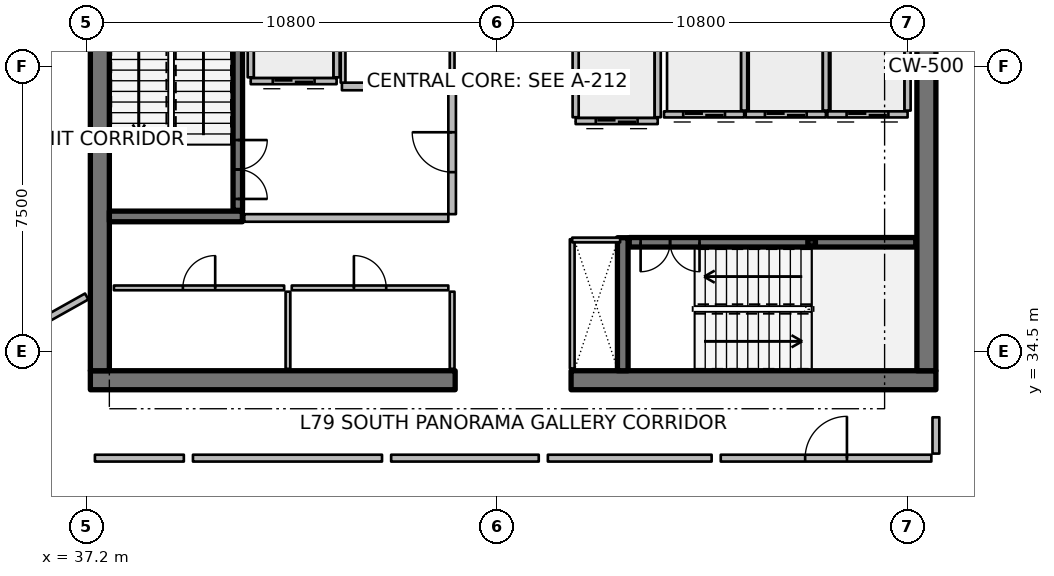
"""IFC4 building model, lengths in metres.
Left out: names, types, materials, properties, quantities, classifications, styles, units other than length and angle.
Written with IfcOpenShell. Run it as: python <this file> out.ifc"""

import sys

from ifc_helpers import new_model, si_unit, direction, frame, frame_2d, origin, origin_2d, place, context, subcontext, project, spatial, rectangle, hollow_rectangle, extrude, element, fill, save


model = new_model("IFC4")
c1 = context("Model", 3, precision=1e-05, world=origin(), true_north=direction((0.0, 1.0)))
c2 = subcontext(c1, "Body", "Model", "MODEL_VIEW")
j1 = project(units=[si_unit("LENGTHUNIT", "METRE"), si_unit("PLANEANGLEUNIT", "RADIAN")], contexts=[c1])
p1 = place(None, origin())
s1 = spatial("IfcSite", under=j1, at=p1, CompositionType="ELEMENT")
p2 = place(p1, origin())
s2 = spatial("IfcBuilding", under=s1, at=p2, CompositionType="ELEMENT")
p3 = place(p2, frame((0.0, 0.0, 313.7)))
s3 = spatial("IfcBuildingStorey", under=s2, at=p3, CompositionType="ELEMENT", Elevation=313.7)
p4 = place(p3, frame((37.3, 33.75, 0.0), z_axis=(0.0, 0.0, 1.0), x_axis=(1.0, 0.0, 0.0)))
e1 = element("IfcWall", 1, at=p4, inside=s3, PredefinedType="SHEAR", context=c2, shape_type="SweptSolid", body=[
    extrude(rectangle(XDim=9.6, YDim=0.5, at=frame_2d((4.8, 0.0))), origin(), (0.0, 0.0, 1.0), 4.2),
])
p5 = place(p3, frame((49.95, 33.75, 0.0), z_axis=(0.0, 0.0, 1.0), x_axis=(1.0, 0.0, 0.0)))
e2 = element("IfcWall", 2, at=p5, inside=s3, PredefinedType="SHEAR", context=c2, shape_type="SweptSolid", body=[
    extrude(rectangle(XDim=9.6, YDim=0.5, at=frame_2d((4.8, 0.0))), origin(), (0.0, 0.0, 1.0), 4.2),
])
for number, where, z_axis, x_axis in (
    (3, (37.55, 34.0, 0.0), (0.0, 0.0, 1.0), (0.0, 1.0, 0.0)),
    (4, (59.3, 34.0, 0.0), (0.0, 0.0, 1.0), (0.0, 1.0, 0.0)),
):
    element("IfcWall", number, at=place(p3, frame(where, z_axis=z_axis, x_axis=x_axis)), inside=s3, PredefinedType="SHEAR", context=c2, shape_type="SweptSolid", body=[
        extrude(rectangle(XDim=16.0, YDim=0.5, at=frame_2d((8.0, 0.0))), origin(), (0.0, 0.0, 1.0), 4.2),
    ])
for number, where, z_axis, x_axis in (
    (5, (37.8, 38.06, 0.0), (0.0, 0.0, 1.0), (1.0, 0.0, 0.0)),
    (6, (51.31, 34.0, 0.0), (0.0, 0.0, 1.0), (0.0, 1.0, 0.0)),
):
    element("IfcWall", number, at=place(p3, frame(where, z_axis=z_axis, x_axis=x_axis)), inside=s3, PredefinedType="SHEAR", context=c2, shape_type="SweptSolid", body=[
        extrude(rectangle(XDim=3.5, YDim=0.28, at=frame_2d((1.75, 0.0))), origin(), (0.0, 0.0, 1.0), 4.2),
    ])
p6 = place(p3, frame((56.28, 37.38, 0.0), z_axis=(0.0, 0.0, 1.0), x_axis=(1.0, 0.0, 0.0)))
e7 = element("IfcColumn", 7, at=p6, inside=s3, PredefinedType="COLUMN", context=c2, shape_type="SweptSolid", body=[
    extrude(hollow_rectangle(XDim=0.2, YDim=0.2, WallThickness=0.01, InnerFilletRadius=0.01, OuterFilletRadius=0.02, at=origin_2d()), origin(), (0.0, 0.0, 1.0), 1.895),
])
p7 = place(p3, frame((41.18, 38.22, 0.0), z_axis=(0.0, 0.0, 1.0), x_axis=(0.0, 1.0, 0.0)))
e8 = element("IfcWall", 8, at=p7, inside=s3, PredefinedType="SOLIDWALL", context=c2, shape_type="SweptSolid", body=[
    extrude(rectangle(XDim=7.56, YDim=0.25, at=frame_2d((3.78, 0.0))), origin(), (0.0, 0.0, 1.0), 3.94),
])
p8 = place(p7, frame((0.3, 0.0, 0.0)))
e9 = element("IfcOpeningElement", 9, at=p8, cuts=e8, PredefinedType="OPENING", context=c2, shape_type="SweptSolid", body=[
    extrude(rectangle(XDim=1.55, YDim=2.15, at=frame_2d((0.775, 1.075))), frame((0.0, 0.135, 0.0), z_axis=(0.0, -1.0, 0.0), x_axis=(1.0, 0.0, 0.0)), (0.0, 0.0, 1.0), 0.27),
])
p9 = place(p3, frame((51.48, 37.38, 0.0), z_axis=(0.0, 0.0, 1.0), x_axis=(1.0, 0.0, 0.0)))
e10 = element("IfcWall", 10, at=p9, inside=s3, PredefinedType="SOLIDWALL", context=c2, shape_type="SweptSolid", body=[
    extrude(rectangle(XDim=7.54, YDim=0.25, at=frame_2d((3.77, 0.0))), origin(), (0.0, 0.0, 1.0), 3.94),
])
p10 = place(p9, frame((0.3, 0.0, 0.0)))
e11 = element("IfcOpeningElement", 11, at=p10, cuts=e10, PredefinedType="OPENING", context=c2, shape_type="SweptSolid", body=[
    extrude(rectangle(XDim=1.55, YDim=2.15, at=frame_2d((0.775, 1.075))), frame((0.0, 0.135, 0.0), z_axis=(0.0, -1.0, 0.0), x_axis=(1.0, 0.0, 0.0)), (0.0, 0.0, 1.0), 0.27),
])
p11 = place(p3, frame((54.505, 40.745, 0.0), z_axis=(0.0, 0.0, 1.0), x_axis=(-1.0, 0.0, 0.0)))
e12 = element("IfcWall", 12, at=p11, inside=s3, PredefinedType="PARTITIONING", context=c2, shape_type="SweptSolid", body=[
    extrude(rectangle(XDim=2.11, YDim=0.16, at=frame_2d((1.055, 0.0))), origin(), (0.0, 0.0, 1.0), 3.94),
])
p12 = place(p11, frame((0.505, 0.0, 0.0)))
e13 = element("IfcOpeningElement", 13, at=p12, cuts=e12, PredefinedType="OPENING", context=c2, shape_type="SweptSolid", body=[
    extrude(rectangle(XDim=1.1, YDim=2.1, at=frame_2d((0.55, 1.05))), frame((0.0, 0.09, 0.0), z_axis=(0.0, -1.0, 0.0), x_axis=(1.0, 0.0, 0.0)), (0.0, 0.0, 1.0), 0.18),
])
p13 = place(p3, frame((54.505, 40.845, 0.0), z_axis=(0.0, 0.0, 1.0), x_axis=(0.0, 1.0, 0.0)))
e14 = element("IfcWall", 14, at=p13, inside=s3, PredefinedType="PARTITIONING", context=c2, shape_type="SweptSolid", body=[
    extrude(rectangle(XDim=1.61, YDim=0.16, at=frame_2d((0.805, 0.0))), origin(), (0.0, 0.0, 1.0), 3.94),
])
p14 = place(p3, frame((56.655, 40.745, 0.0), z_axis=(0.0, 0.0, 1.0), x_axis=(-1.0, 0.0, 0.0)))
e15 = element("IfcWall", 15, at=p14, inside=s3, PredefinedType="PARTITIONING", context=c2, shape_type="SweptSolid", body=[
    extrude(rectangle(XDim=2.11, YDim=0.16, at=frame_2d((1.055, 0.0))), origin(), (0.0, 0.0, 1.0), 3.94),
])
p15 = place(p14, frame((0.505, 0.0, 0.0)))
e16 = element("IfcOpeningElement", 16, at=p15, cuts=e15, PredefinedType="OPENING", context=c2, shape_type="SweptSolid", body=[
    extrude(rectangle(XDim=1.1, YDim=2.1, at=frame_2d((0.55, 1.05))), frame((0.0, 0.09, 0.0), z_axis=(0.0, -1.0, 0.0), x_axis=(1.0, 0.0, 0.0)), (0.0, 0.0, 1.0), 0.18),
])
p16 = place(p3, frame((56.655, 40.845, 0.0), z_axis=(0.0, 0.0, 1.0), x_axis=(0.0, 1.0, 0.0)))
e17 = element("IfcWall", 17, at=p16, inside=s3, PredefinedType="PARTITIONING", context=c2, shape_type="SweptSolid", body=[
    extrude(rectangle(XDim=1.61, YDim=0.16, at=frame_2d((0.805, 0.0))), origin(), (0.0, 0.0, 1.0), 3.94),
])
p17 = place(p3, frame((58.805, 40.745, 0.0), z_axis=(0.0, 0.0, 1.0), x_axis=(-1.0, 0.0, 0.0)))
e18 = element("IfcWall", 18, at=p17, inside=s3, PredefinedType="PARTITIONING", context=c2, shape_type="SweptSolid", body=[
    extrude(rectangle(XDim=2.11, YDim=0.16, at=frame_2d((1.055, 0.0))), origin(), (0.0, 0.0, 1.0), 3.94),
])
p18 = place(p17, frame((0.505, 0.0, 0.0)))
e19 = element("IfcOpeningElement", 19, at=p18, cuts=e18, PredefinedType="OPENING", context=c2, shape_type="SweptSolid", body=[
    extrude(rectangle(XDim=1.1, YDim=2.1, at=frame_2d((0.55, 1.05))), frame((0.0, 0.09, 0.0), z_axis=(0.0, -1.0, 0.0), x_axis=(1.0, 0.0, 0.0)), (0.0, 0.0, 1.0), 0.18),
])
p19 = place(p3, frame((58.805, 40.845, 0.0), z_axis=(0.0, 0.0, 1.0), x_axis=(0.0, 1.0, 0.0)))
e20 = element("IfcWall", 20, at=p19, inside=s3, PredefinedType="PARTITIONING", context=c2, shape_type="SweptSolid", body=[
    extrude(rectangle(XDim=1.61, YDim=0.16, at=frame_2d((0.805, 0.0))), origin(), (0.0, 0.0, 1.0), 3.94),
])
p20 = place(p3, frame((43.78, 41.62, 0.0), z_axis=(0.0, 0.0, 1.0), x_axis=(-1.0, 0.0, 0.0)))
e21 = element("IfcWall", 21, at=p20, inside=s3, PredefinedType="PARTITIONING", context=c2, shape_type="SweptSolid", body=[
    extrude(rectangle(XDim=2.26, YDim=0.16, at=frame_2d((1.13, 0.0))), origin(), (0.0, 0.0, 1.0), 3.94),
])
p21 = place(p20, frame((0.58, 0.0, 0.0)))
e22 = element("IfcOpeningElement", 22, at=p21, cuts=e21, PredefinedType="OPENING", context=c2, shape_type="SweptSolid", body=[
    extrude(rectangle(XDim=1.1, YDim=2.1, at=frame_2d((0.55, 1.05))), frame((0.0, 0.09, 0.0), z_axis=(0.0, -1.0, 0.0), x_axis=(1.0, 0.0, 0.0)), (0.0, 0.0, 1.0), 0.18),
])
for number, where, z_axis, x_axis in (
    (23, (43.78, 41.72, 0.0), (0.0, 0.0, 1.0), (0.0, 1.0, 0.0)),
    (24, (41.52, 41.72, 0.0), (0.0, 0.0, 1.0), (0.0, 1.0, 0.0)),
):
    element("IfcWall", number, at=place(p3, frame(where, z_axis=z_axis, x_axis=x_axis)), inside=s3, PredefinedType="PARTITIONING", context=c2, shape_type="SweptSolid", body=[
        extrude(rectangle(XDim=2.26, YDim=0.16, at=frame_2d((1.13, 0.0))), origin(), (0.0, 0.0, 1.0), 3.94),
    ])
p22 = place(p3, frame((52.23, 40.57, 0.0), z_axis=(0.0, 0.0, 1.0), x_axis=(-1.0, 0.0, 0.0)))
e25 = element("IfcWall", 25, at=p22, inside=s3, PredefinedType="PARTITIONING", context=c2, shape_type="SweptSolid", body=[
    extrude(rectangle(XDim=2.16, YDim=0.16, at=frame_2d((1.08, 0.0))), origin(), (0.0, 0.0, 1.0), 3.94),
])
p23 = place(p22, frame((0.53, 0.0, 0.0)))
e26 = element("IfcOpeningElement", 26, at=p23, cuts=e25, PredefinedType="OPENING", context=c2, shape_type="SweptSolid", body=[
    extrude(rectangle(XDim=1.1, YDim=2.1, at=frame_2d((0.55, 1.05))), frame((0.0, 0.09, 0.0), z_axis=(0.0, -1.0, 0.0), x_axis=(1.0, 0.0, 0.0)), (0.0, 0.0, 1.0), 0.18),
])
for number, where, z_axis, x_axis in (
    (27, (52.23, 40.67, 0.0), (0.0, 0.0, 1.0), (0.0, 1.0, 0.0)),
    (28, (50.07, 40.67, 0.0), (0.0, 0.0, 1.0), (0.0, 1.0, 0.0)),
):
    element("IfcWall", number, at=place(p3, frame(where, z_axis=z_axis, x_axis=x_axis)), inside=s3, PredefinedType="PARTITIONING", context=c2, shape_type="SweptSolid", body=[
        extrude(rectangle(XDim=2.16, YDim=0.16, at=frame_2d((1.08, 0.0))), origin(), (0.0, 0.0, 1.0), 3.94),
    ])
for number, where, z_axis, x_axis in (
    (29, (46.82, 34.05, 0.0), (0.0, 0.0, 1.0), (0.0, 1.0, 0.0)),
    (30, (42.5, 34.05, 0.0), (0.0, 0.0, 1.0), (0.0, 1.0, 0.0)),
):
    element("IfcWall", number, at=place(p3, frame(where, z_axis=z_axis, x_axis=x_axis)), inside=s3, PredefinedType="PARTITIONING", context=c2, shape_type="SweptSolid", body=[
        extrude(rectangle(XDim=2.03, YDim=0.125, at=frame_2d((1.015, 0.0))), origin(), (0.0, 0.0, 1.0), 3.38),
    ])
p24 = place(p3, frame((37.92, 36.18, 0.0), z_axis=(0.0, 0.0, 1.0), x_axis=(1.0, 0.0, 0.0)))
e31 = element("IfcWall", 31, at=p24, inside=s3, PredefinedType="PARTITIONING", context=c2, shape_type="SweptSolid", body=[
    extrude(rectangle(XDim=4.48, YDim=0.125, at=frame_2d((2.24, 0.0))), origin(), (0.0, 0.0, 1.0), 3.38),
])
p25 = place(p24, frame((1.815, 0.0, 0.0)))
e32 = element("IfcOpeningElement", 32, at=p25, cuts=e31, PredefinedType="OPENING", context=c2, shape_type="SweptSolid", body=[
    extrude(rectangle(XDim=0.85, YDim=2.06, at=frame_2d((0.425, 1.03))), frame((0.0, 0.073, 0.0), z_axis=(0.0, -1.0, 0.0), x_axis=(1.0, 0.0, 0.0)), (0.0, 0.0, 1.0), 0.145),
])
p26 = place(p3, frame((42.6, 36.18, 0.0), z_axis=(0.0, 0.0, 1.0), x_axis=(1.0, 0.0, 0.0)))
e33 = element("IfcWall", 33, at=p26, inside=s3, PredefinedType="PARTITIONING", context=c2, shape_type="SweptSolid", body=[
    extrude(rectangle(XDim=4.12, YDim=0.125, at=frame_2d((2.06, 0.0))), origin(), (0.0, 0.0, 1.0), 3.38),
])
p27 = place(p26, frame((1.635, 0.0, 0.0)))
e34 = element("IfcOpeningElement", 34, at=p27, cuts=e33, PredefinedType="OPENING", context=c2, shape_type="SweptSolid", body=[
    extrude(rectangle(XDim=0.85, YDim=2.06, at=frame_2d((0.425, 1.03))), frame((0.0, 0.073, 0.0), z_axis=(0.0, -1.0, 0.0), x_axis=(1.0, 0.0, 0.0)), (0.0, 0.0, 1.0), 0.145),
])
p28 = place(p3, frame((41.35, 38.02, 0.0), z_axis=(0.0, 0.0, 1.0), x_axis=(1.0, 0.0, 0.0)))
e35 = element("IfcWall", 35, at=p28, inside=s3, PredefinedType="PARTITIONING", context=c2, shape_type="SweptSolid", body=[
    extrude(rectangle(XDim=5.37, YDim=0.2, at=frame_2d((2.685, 0.0))), origin(), (0.0, 0.0, 1.0), 3.94),
])
p29 = place(p3, frame((43.92, 41.48, 0.0), z_axis=(0.0, 0.0, 1.0), x_axis=(1.0, 0.0, 0.0)))
e36 = element("IfcWall", 36, at=p29, inside=s3, PredefinedType="PARTITIONING", context=c2, shape_type="SweptSolid", body=[
    extrude(rectangle(XDim=2.8, YDim=0.2, at=frame_2d((1.4, 0.0))), origin(), (0.0, 0.0, 1.0), 3.94),
])
p30 = place(p3, frame((46.82, 38.12, 0.0), z_axis=(0.0, 0.0, 1.0), x_axis=(0.0, 1.0, 0.0)))
e37 = element("IfcWall", 37, at=p30, inside=s3, PredefinedType="PARTITIONING", context=c2, shape_type="SweptSolid", body=[
    extrude(rectangle(XDim=3.26, YDim=0.2, at=frame_2d((1.63, 0.0))), origin(), (0.0, 0.0, 1.0), 3.94),
])
p31 = place(p30, frame((1.105, 0.0, 0.0)))
e38 = element("IfcOpeningElement", 38, at=p31, cuts=e37, PredefinedType="OPENING", context=c2, shape_type="SweptSolid", body=[
    extrude(rectangle(XDim=1.05, YDim=2.1, at=frame_2d((0.525, 1.05))), frame((0.0, 0.11, 0.0), z_axis=(0.0, -1.0, 0.0), x_axis=(1.0, 0.0, 0.0)), (0.0, 0.0, 1.0), 0.22),
])
p32 = place(p3, frame((49.98, 34.06, 0.0), z_axis=(0.0, 0.0, 1.0), x_axis=(0.0, 1.0, 0.0)))
e39 = element("IfcWall", 39, at=p32, inside=s3, PredefinedType="PARTITIONING", context=c2, shape_type="SweptSolid", body=[
    extrude(rectangle(XDim=3.4, YDim=0.125, at=frame_2d((1.7, 0.0))), origin(), (0.0, 0.0, 1.0), 3.38),
])
p33 = place(p3, frame((49.98, 37.44, 0.0), z_axis=(0.0, 0.0, 1.0), x_axis=(1.0, 0.0, 0.0)))
e40 = element("IfcWall", 40, at=p33, inside=s3, PredefinedType="PARTITIONING", context=c2, shape_type="SweptSolid", body=[
    extrude(rectangle(XDim=1.26, YDim=0.125, at=frame_2d((0.63, 0.0))), origin(), (0.0, 0.0, 1.0), 3.38),
])
p34 = place(p3, frame((43.95, 41.58, 0.0), z_axis=(0.0, 0.0, 1.0), x_axis=(0.0, 1.0, 0.0)))
e41 = element("IfcWall", 41, at=p34, inside=s3, PredefinedType="PARTITIONING", context=c2, shape_type="SweptSolid", body=[
    extrude(rectangle(XDim=4.32, YDim=0.125, at=frame_2d((2.16, 0.0))), origin(), (0.0, 0.0, 1.0), 3.38),
])
p35 = place(p3, frame((46.82, 41.58, 0.0), z_axis=(0.0, 0.0, 1.0), x_axis=(0.0, 1.0, 0.0)))
e42 = element("IfcWall", 42, at=p35, inside=s3, PredefinedType="PARTITIONING", context=c2, shape_type="SweptSolid", body=[
    extrude(rectangle(XDim=4.3, YDim=0.125, at=frame_2d((2.15, 0.0))), origin(), (0.0, 0.0, 1.0), 3.38),
])
p36 = place(p35, frame((1.725, 0.0, 0.0)))
e43 = element("IfcOpeningElement", 43, at=p36, cuts=e42, PredefinedType="OPENING", context=c2, shape_type="SweptSolid", body=[
    extrude(rectangle(XDim=0.85, YDim=2.06, at=frame_2d((0.425, 1.03))), frame((0.0, 0.073, 0.0), z_axis=(0.0, -1.0, 0.0), x_axis=(1.0, 0.0, 0.0)), (0.0, 0.0, 1.0), 0.145),
])
p37 = place(p3, frame((37.204, 35.954, 0.0), z_axis=(0.0, 0.0, 1.0), x_axis=(-0.872495191914, -0.488622697064, 0.0)))
e44 = element("IfcWall", 44, at=p37, inside=s3, PredefinedType="PARTITIONING", context=c2, shape_type="SweptSolid", body=[
    extrude(rectangle(XDim=13.462, YDim=0.18, at=frame_2d((6.731, 0.0))), origin(), (0.0, 0.0, 1.0), 3.38),
])
p38 = place(p3, frame((53.888, 31.7, 0.0), z_axis=(0.0, 0.0, 1.0), x_axis=(1.0, 0.0, 0.0)))
e45 = element("IfcWall", 45, at=p38, inside=s3, PredefinedType="PARTITIONING", context=c2, shape_type="SweptSolid", body=[
    extrude(rectangle(XDim=5.542, YDim=0.18, at=frame_2d((2.771, 0.0))), origin(), (0.0, 0.0, 1.0), 3.38),
])
p39 = place(p38, frame((2.221, 0.0, 0.0)))
e46 = element("IfcOpeningElement", 46, at=p39, cuts=e45, PredefinedType="OPENING", context=c2, shape_type="SweptSolid", body=[
    extrude(rectangle(XDim=1.1, YDim=2.1, at=frame_2d((0.55, 1.05))), frame((0.0, 0.1, 0.0), z_axis=(0.0, -1.0, 0.0), x_axis=(1.0, 0.0, 0.0)), (0.0, 0.0, 1.0), 0.2),
])
p40 = place(p3, frame((59.55, 31.82, 0.0), z_axis=(0.0, 0.0, 1.0), x_axis=(0.0, 1.0, 0.0)))
e47 = element("IfcWall", 47, at=p40, inside=s3, PredefinedType="PARTITIONING", context=c2, shape_type="SweptSolid", body=[
    extrude(rectangle(XDim=0.955, YDim=0.18, at=frame_2d((0.477, 0.0))), origin(), (0.0, 0.0, 1.0), 3.38),
])
p41 = place(p3, frame((37.42, 31.7, 0.0), z_axis=(0.0, 0.0, 1.0), x_axis=(1.0, 0.0, 0.0)))
e48 = element("IfcWall", 48, at=p41, inside=s3, PredefinedType="PARTITIONING", context=c2, shape_type="SweptSolid", body=[
    extrude(rectangle(XDim=2.34, YDim=0.18, at=frame_2d((1.17, 0.0))), origin(), (0.0, 0.0, 1.0), 3.38),
])
p42 = place(p3, frame((40.0, 31.7, 0.0), z_axis=(0.0, 0.0, 1.0), x_axis=(1.0, 0.0, 0.0)))
e49 = element("IfcWall", 49, at=p42, inside=s3, PredefinedType="PARTITIONING", context=c2, shape_type="SweptSolid", body=[
    extrude(rectangle(XDim=4.975, YDim=0.18, at=frame_2d((2.488, 0.0))), origin(), (0.0, 0.0, 1.0), 3.38),
])
p43 = place(p3, frame((45.215, 31.7, 0.0), z_axis=(0.0, 0.0, 1.0), x_axis=(1.0, 0.0, 0.0)))
e50 = element("IfcWall", 50, at=p43, inside=s3, PredefinedType="PARTITIONING", context=c2, shape_type="SweptSolid", body=[
    extrude(rectangle(XDim=3.884, YDim=0.18, at=frame_2d((1.942, 0.0))), origin(), (0.0, 0.0, 1.0), 3.38),
])
p44 = place(p3, frame((49.339, 31.7, 0.0), z_axis=(0.0, 0.0, 1.0), x_axis=(1.0, 0.0, 0.0)))
e51 = element("IfcWall", 51, at=p44, inside=s3, PredefinedType="PARTITIONING", context=c2, shape_type="SweptSolid", body=[
    extrude(rectangle(XDim=4.309, YDim=0.18, at=frame_2d((2.155, 0.0))), origin(), (0.0, 0.0, 1.0), 3.38),
])
p45 = place(p8, origin())
e52 = element("IfcDoor", 52, at=p45, inside=s3, OperationType="DOUBLE_DOOR_SINGLE_SWING", PredefinedType="DOOR", context=c2, shape_type="SweptSolid", body=[
    extrude(rectangle(XDim=1.55, YDim=2.15, at=frame_2d((0.775, 1.075))), frame((0.0, 0.025, 0.0), z_axis=(0.0, -1.0, 0.0), x_axis=(1.0, 0.0, 0.0)), (0.0, 0.0, 1.0), 0.05),
])
fill(e9, e52)
p46 = place(p10, origin())
e53 = element("IfcDoor", 53, at=p46, inside=s3, OperationType="DOUBLE_DOOR_SINGLE_SWING", PredefinedType="DOOR", context=c2, shape_type="SweptSolid", body=[
    extrude(rectangle(XDim=1.55, YDim=2.15, at=frame_2d((0.775, 1.075))), frame((0.0, 0.025, 0.0), z_axis=(0.0, -1.0, 0.0), x_axis=(1.0, 0.0, 0.0)), (0.0, 0.0, 1.0), 0.05),
])
fill(e11, e53)
p47 = place(p12, origin())
e54 = element("IfcDoor", 54, at=p47, inside=s3, OperationType="DOUBLE_DOOR_SLIDING", PredefinedType="DOOR", context=c2, shape_type="SweptSolid", body=[
    extrude(rectangle(XDim=1.1, YDim=2.1, at=frame_2d((0.55, 1.05))), frame((0.0, 0.025, 0.0), z_axis=(0.0, -1.0, 0.0), x_axis=(1.0, 0.0, 0.0)), (0.0, 0.0, 1.0), 0.05),
])
fill(e13, e54)
p48 = place(p15, origin())
e55 = element("IfcDoor", 55, at=p48, inside=s3, OperationType="DOUBLE_DOOR_SLIDING", PredefinedType="DOOR", context=c2, shape_type="SweptSolid", body=[
    extrude(rectangle(XDim=1.1, YDim=2.1, at=frame_2d((0.55, 1.05))), frame((0.0, 0.025, 0.0), z_axis=(0.0, -1.0, 0.0), x_axis=(1.0, 0.0, 0.0)), (0.0, 0.0, 1.0), 0.05),
])
fill(e16, e55)
p49 = place(p18, origin())
e56 = element("IfcDoor", 56, at=p49, inside=s3, OperationType="DOUBLE_DOOR_SLIDING", PredefinedType="DOOR", context=c2, shape_type="SweptSolid", body=[
    extrude(rectangle(XDim=1.1, YDim=2.1, at=frame_2d((0.55, 1.05))), frame((0.0, 0.025, 0.0), z_axis=(0.0, -1.0, 0.0), x_axis=(1.0, 0.0, 0.0)), (0.0, 0.0, 1.0), 0.05),
])
fill(e19, e56)
p50 = place(p21, origin())
e57 = element("IfcDoor", 57, at=p50, inside=s3, OperationType="DOUBLE_DOOR_SLIDING", PredefinedType="DOOR", context=c2, shape_type="SweptSolid", body=[
    extrude(rectangle(XDim=1.1, YDim=2.1, at=frame_2d((0.55, 1.05))), frame((0.0, 0.025, 0.0), z_axis=(0.0, -1.0, 0.0), x_axis=(1.0, 0.0, 0.0)), (0.0, 0.0, 1.0), 0.05),
])
fill(e22, e57)
p51 = place(p23, origin())
e58 = element("IfcDoor", 58, at=p51, inside=s3, OperationType="DOUBLE_DOOR_SLIDING", PredefinedType="DOOR", context=c2, shape_type="SweptSolid", body=[
    extrude(rectangle(XDim=1.1, YDim=2.1, at=frame_2d((0.55, 1.05))), frame((0.0, 0.025, 0.0), z_axis=(0.0, -1.0, 0.0), x_axis=(1.0, 0.0, 0.0)), (0.0, 0.0, 1.0), 0.05),
])
fill(e26, e58)
p52 = place(p25, origin())
e59 = element("IfcDoor", 59, at=p52, inside=s3, OperationType="SINGLE_SWING_RIGHT", PredefinedType="DOOR", context=c2, shape_type="SweptSolid", body=[
    extrude(rectangle(XDim=0.85, YDim=2.06, at=frame_2d((0.425, 1.03))), frame((0.0, 0.025, 0.0), z_axis=(0.0, -1.0, 0.0), x_axis=(1.0, 0.0, 0.0)), (0.0, 0.0, 1.0), 0.05),
])
fill(e32, e59)
p53 = place(p27, origin())
e60 = element("IfcDoor", 60, at=p53, inside=s3, OperationType="SINGLE_SWING_LEFT", PredefinedType="DOOR", context=c2, shape_type="SweptSolid", body=[
    extrude(rectangle(XDim=0.85, YDim=2.06, at=frame_2d((0.425, 1.03))), frame((0.0, 0.025, 0.0), z_axis=(0.0, -1.0, 0.0), x_axis=(1.0, 0.0, 0.0)), (0.0, 0.0, 1.0), 0.05),
])
fill(e34, e60)
p54 = place(p31, origin())
e61 = element("IfcDoor", 61, at=p54, inside=s3, OperationType="SINGLE_SWING_RIGHT", PredefinedType="DOOR", context=c2, shape_type="SweptSolid", body=[
    extrude(rectangle(XDim=1.05, YDim=2.1, at=frame_2d((0.525, 1.05))), frame((0.0, 0.025, 0.0), z_axis=(0.0, -1.0, 0.0), x_axis=(1.0, 0.0, 0.0)), (0.0, 0.0, 1.0), 0.05),
])
fill(e38, e61)
p55 = place(p39, origin())
e62 = element("IfcDoor", 62, at=p55, inside=s3, OperationType="SINGLE_SWING_RIGHT", PredefinedType="DOOR", context=c2, shape_type="SweptSolid", body=[
    extrude(rectangle(XDim=1.1, YDim=2.1, at=frame_2d((0.55, 1.05))), frame((0.0, 0.025, 0.0), z_axis=(0.0, -1.0, 0.0), x_axis=(1.0, 0.0, 0.0)), (0.0, 0.0, 1.0), 0.05),
])
fill(e46, e62)
save(model, sys.argv[1])
